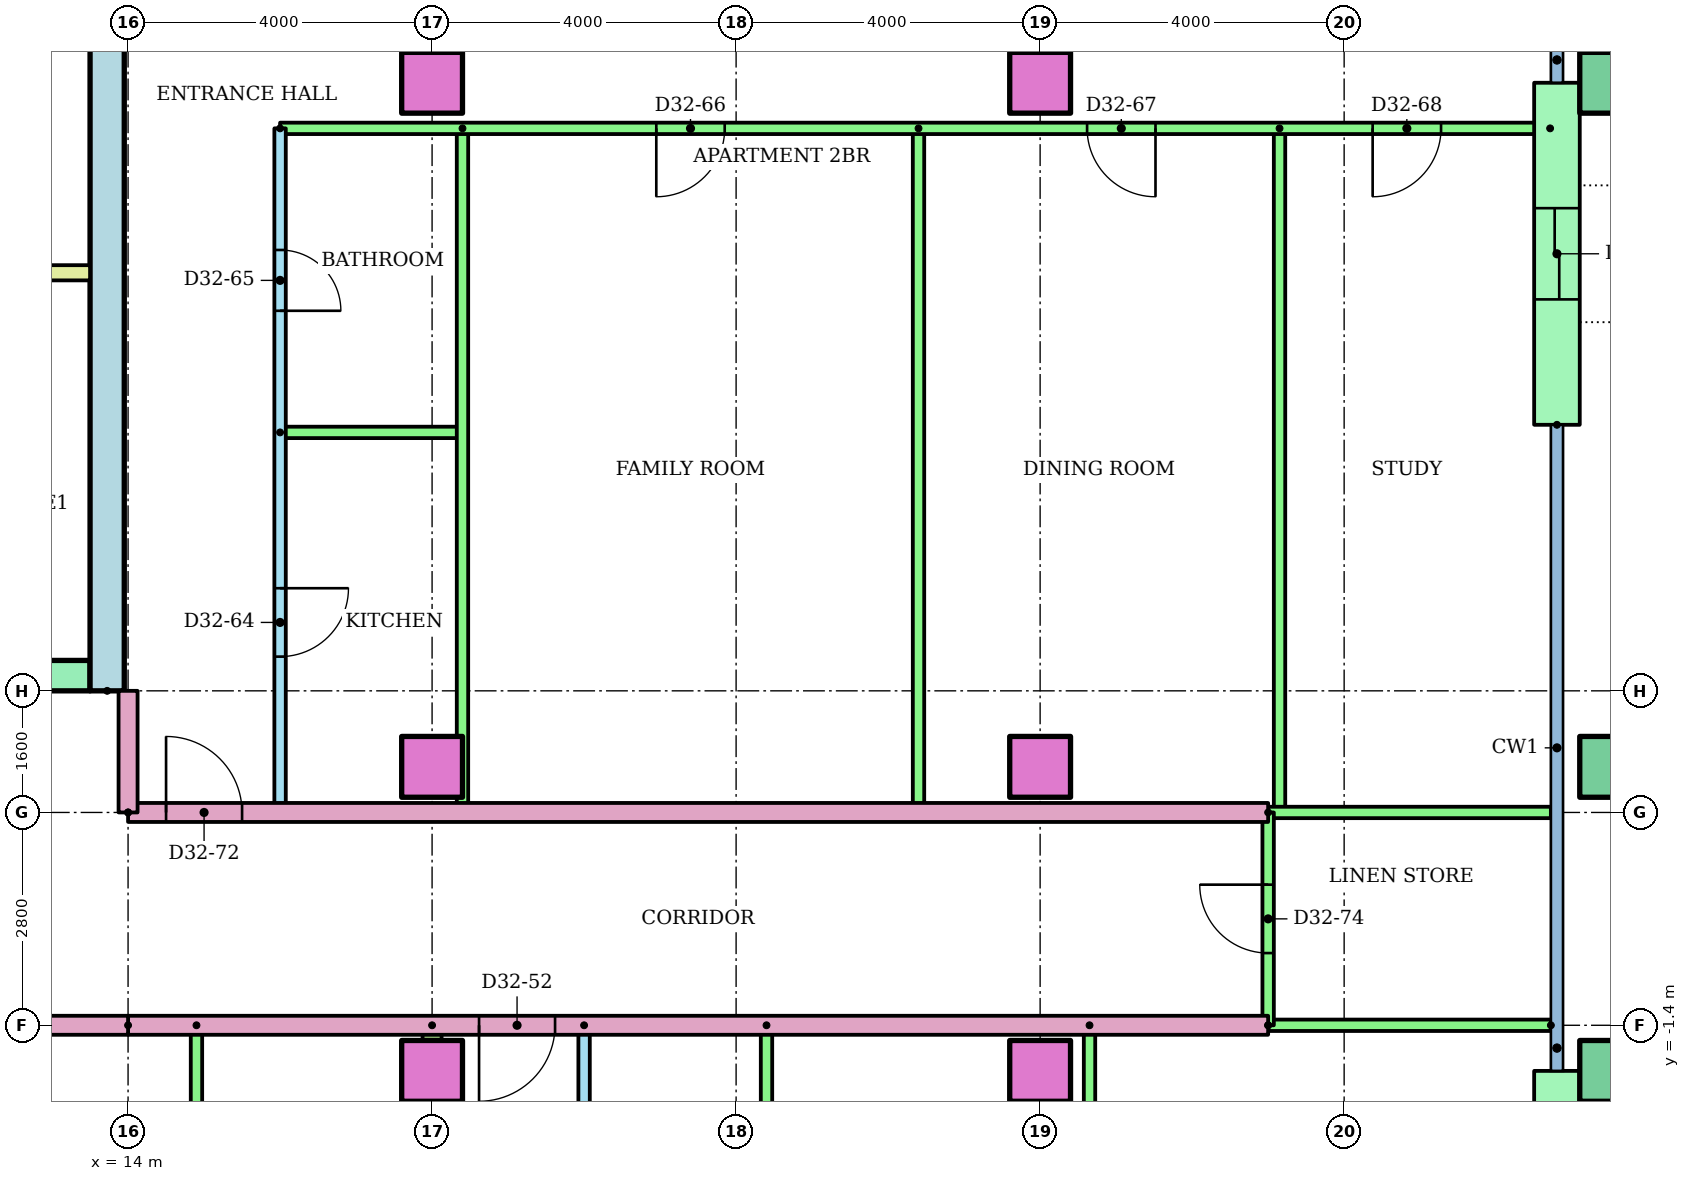
"""IFC4 building model, lengths in metres.
Left out: names, types, materials, properties, quantities, classifications, styles, units other than length and angle.
Written with IfcOpenShell. Run it as: python <this file> out.ifc"""

import sys

from ifc_helpers import new_model, si_unit, direction, frame, frame_2d, origin, origin_2d, place, context, subcontext, project, spatial, rectangle, hollow_rectangle, extrude, element, fill, save


model = new_model("IFC4")
c1 = context("Model", 3, precision=1e-05, world=origin(), true_north=direction((0.0, 1.0)))
c2 = subcontext(c1, "Body", "Model", "MODEL_VIEW")
j1 = project(units=[si_unit("LENGTHUNIT", "METRE"), si_unit("PLANEANGLEUNIT", "RADIAN")], contexts=[c1])
p1 = place(None, origin())
s1 = spatial("IfcSite", under=j1, at=p1, CompositionType="ELEMENT")
p2 = place(p1, origin())
s2 = spatial("IfcBuilding", under=s1, at=p2, CompositionType="ELEMENT")
p3 = place(p2, frame((0.0, 0.0, 126.2)))
s3 = spatial("IfcBuildingStorey", under=s2, at=p3, CompositionType="ELEMENT", Elevation=126.2)
for number, where in (
    (1, (18.0, -2.0, 0.0)),
    (2, (26.0, -2.0, 0.0)),
):
    element("IfcColumn", number, at=place(p3, frame(where)), inside=s3, PredefinedType="COLUMN", context=c2, shape_type="SweptSolid", body=[
        extrude(rectangle(XDim=0.8, YDim=0.8, at=origin_2d()), origin(), (0.0, 0.0, 1.0), 3.2),
    ])
p4 = place(p3, frame((33.5, -2.0, 0.0)))
e3 = element("IfcColumn", 3, at=p4, inside=s3, PredefinedType="COLUMN", context=c2, shape_type="SweptSolid", body=[
    extrude(hollow_rectangle(XDim=0.8, YDim=0.8, WallThickness=0.04, at=origin_2d()), origin(), (0.0, 0.0, 1.0), 3.2),
])
for number, where in (
    (4, (18.0, 2.0, 0.0)),
    (5, (26.0, 2.0, 0.0)),
):
    element("IfcColumn", number, at=place(p3, frame(where)), inside=s3, PredefinedType="COLUMN", context=c2, shape_type="SweptSolid", body=[
        extrude(rectangle(XDim=0.8, YDim=0.8, at=origin_2d()), origin(), (0.0, 0.0, 1.0), 3.2),
    ])
p5 = place(p3, frame((33.5, 2.0, 0.0)))
e6 = element("IfcColumn", 6, at=p5, inside=s3, PredefinedType="COLUMN", context=c2, shape_type="SweptSolid", body=[
    extrude(hollow_rectangle(XDim=0.8, YDim=0.8, WallThickness=0.04, at=origin_2d()), origin(), (0.0, 0.0, 1.0), 3.2),
])
for number, where in (
    (7, (18.0, 11.0, 0.0)),
    (8, (26.0, 11.0, 0.0)),
):
    element("IfcColumn", number, at=place(p3, frame(where)), inside=s3, PredefinedType="COLUMN", context=c2, shape_type="SweptSolid", body=[
        extrude(rectangle(XDim=0.8, YDim=0.8, at=origin_2d()), origin(), (0.0, 0.0, 1.0), 3.2),
    ])
p6 = place(p3, frame((33.5, 11.0, 0.0)))
e9 = element("IfcColumn", 9, at=p6, inside=s3, PredefinedType="COLUMN", context=c2, shape_type="SweptSolid", body=[
    extrude(hollow_rectangle(XDim=0.8, YDim=0.8, WallThickness=0.04, at=origin_2d()), origin(), (0.0, 0.0, 1.0), 3.2),
])
p7 = place(p3, frame((32.8, -5.7, 0.0), z_axis=(0.0, 0.0, 1.0), x_axis=(0.0, 1.0, 0.0)))
e10 = element("IfcWall", 10, at=p7, inside=s3, PredefinedType="STANDARD", context=c2, shape_type="SweptSolid", body=[
    extrude(rectangle(XDim=3.7, YDim=0.6, at=frame_2d((1.85, 0.0))), origin(), (0.0, 0.0, 1.0), 2.92),
])
p8 = place(p7, frame((1.25, 0.0, 0.0)))
e11 = element("IfcOpeningElement", 11, at=p8, cuts=e10, PredefinedType="OPENING", context=c2, shape_type="SweptSolid", body=[
    extrude(rectangle(XDim=1.2, YDim=2.1, at=frame_2d((0.6, 1.05))), frame((0.0, 0.31, 0.0), z_axis=(0.0, -1.0, 0.0), x_axis=(1.0, 0.0, 0.0)), (0.0, 0.0, 1.0), 0.62),
])
p9 = place(p3, frame((32.8, 6.5, 0.0), z_axis=(0.0, 0.0, 1.0), x_axis=(0.0, 1.0, 0.0)))
e12 = element("IfcWall", 12, at=p9, inside=s3, PredefinedType="STANDARD", context=c2, shape_type="SweptSolid", body=[
    extrude(rectangle(XDim=4.5, YDim=0.6, at=frame_2d((2.25, 0.0))), origin(), (0.0, 0.0, 1.0), 2.92),
])
p10 = place(p9, frame((1.65, 0.0, 0.0)))
e13 = element("IfcOpeningElement", 13, at=p10, cuts=e12, PredefinedType="OPENING", context=c2, shape_type="SweptSolid", body=[
    extrude(rectangle(XDim=1.2, YDim=2.1, at=frame_2d((0.6, 1.05))), frame((0.0, 0.31, 0.0), z_axis=(0.0, -1.0, 0.0), x_axis=(1.0, 0.0, 0.0)), (0.0, 0.0, 1.0), 0.62),
])
p11 = place(p3, frame((13.725, 3.0, 0.0), z_axis=(0.0, 0.0, 1.0), x_axis=(0.0, 1.0, 0.0)))
e14 = element("IfcWall", 14, at=p11, inside=s3, PredefinedType="SHEAR", context=c2, shape_type="SweptSolid", body=[
    extrude(rectangle(XDim=17.0, YDim=0.45, at=frame_2d((8.5, 0.0))), origin(), (0.0, 0.0, 1.0), 2.92),
])
p12 = place(p3, frame((-13.5, 3.2, 0.0)))
e15 = element("IfcWall", 15, at=p12, inside=s3, PredefinedType="SHEAR", context=c2, shape_type="SweptSolid", body=[
    extrude(rectangle(XDim=27.0, YDim=0.4, at=frame_2d((13.5, 0.0))), origin(), (0.0, 0.0, 1.0), 2.92),
])
p13 = place(p12, frame((6.861, 0.0, 0.0)))
e16 = element("IfcOpeningElement", 16, at=p13, cuts=e15, PredefinedType="OPENING", context=c2, shape_type="SweptSolid", body=[
    extrude(rectangle(XDim=1.1, YDim=2.1, at=frame_2d((0.55, 1.05))), frame((0.0, 0.21, 0.0), z_axis=(0.0, -1.0, 0.0), x_axis=(1.0, 0.0, 0.0)), (0.0, 0.0, 1.0), 0.42),
])
p14 = place(p12, frame((9.906, 0.0, 0.0)))
e17 = element("IfcOpeningElement", 17, at=p14, cuts=e15, PredefinedType="OPENING", context=c2, shape_type="SweptSolid", body=[
    extrude(rectangle(XDim=1.1, YDim=2.1, at=frame_2d((0.55, 1.05))), frame((0.0, 0.21, 0.0), z_axis=(0.0, -1.0, 0.0), x_axis=(1.0, 0.0, 0.0)), (0.0, 0.0, 1.0), 0.42),
])
p15 = place(p12, frame((15.994, 0.0, 0.0)))
e18 = element("IfcOpeningElement", 18, at=p15, cuts=e15, PredefinedType="OPENING", context=c2, shape_type="SweptSolid", body=[
    extrude(rectangle(XDim=1.1, YDim=2.1, at=frame_2d((0.55, 1.05))), frame((0.0, 0.21, 0.0), z_axis=(0.0, -1.0, 0.0), x_axis=(1.0, 0.0, 0.0)), (0.0, 0.0, 1.0), 0.42),
])
p16 = place(p12, frame((19.039, 0.0, 0.0)))
e19 = element("IfcOpeningElement", 19, at=p16, cuts=e15, PredefinedType="OPENING", context=c2, shape_type="SweptSolid", body=[
    extrude(rectangle(XDim=1.1, YDim=2.1, at=frame_2d((0.55, 1.05))), frame((0.0, 0.21, 0.0), z_axis=(0.0, -1.0, 0.0), x_axis=(1.0, 0.0, 0.0)), (0.0, 0.0, 1.0), 0.42),
])
p17 = place(p12, frame((12.6, 0.0, 0.0)))
e20 = element("IfcOpeningElement", 20, at=p17, cuts=e15, PredefinedType="OPENING", context=c2, shape_type="SweptSolid", body=[
    extrude(rectangle(XDim=1.8, YDim=2.1, at=frame_2d((0.9, 1.05))), frame((0.0, 0.21, 0.0), z_axis=(0.0, -1.0, 0.0), x_axis=(1.0, 0.0, 0.0)), (0.0, 0.0, 1.0), 0.42),
])
p18 = place(p3, frame((9.6, 8.5, 0.0)))
e21 = element("IfcWall", 21, at=p18, inside=s3, PredefinedType="PARTITIONING", context=c2, shape_type="SweptSolid", body=[
    extrude(rectangle(XDim=3.9, YDim=0.2, at=frame_2d((1.95, 0.0))), origin(), (0.0, 0.0, 1.0), 2.92),
])
p19 = place(p3, frame((14.9, -1.4, 0.0), z_axis=(0.0, 0.0, 1.0), x_axis=(0.0, -1.0, 0.0)))
e22 = element("IfcWall", 22, at=p19, inside=s3, PredefinedType="PARTITIONING", context=c2, shape_type="SweptSolid", body=[
    extrude(rectangle(XDim=6.6, YDim=0.15, at=frame_2d((3.3, 0.0))), origin(), (0.0, 0.0, 1.0), 2.4),
])
p20 = place(p3, frame((20.0, -1.4, 0.0), z_axis=(0.0, 0.0, 1.0), x_axis=(0.0, -1.0, 0.0)))
e23 = element("IfcWall", 23, at=p20, inside=s3, PredefinedType="PARTITIONING", context=c2, shape_type="SweptSolid", body=[
    extrude(rectangle(XDim=6.6, YDim=0.15, at=frame_2d((3.3, 0.0))), origin(), (0.0, 0.0, 1.0), 2.4),
])
p21 = place(p20, frame((1.425, 0.0, 0.0)))
e24 = element("IfcOpeningElement", 24, at=p21, cuts=e23, PredefinedType="OPENING", context=c2, shape_type="SweptSolid", body=[
    extrude(rectangle(XDim=0.9, YDim=2.1, at=frame_2d((0.45, 1.05))), frame((0.0, 0.085, 0.0), z_axis=(0.0, -1.0, 0.0), x_axis=(1.0, 0.0, 0.0)), (0.0, 0.0, 1.0), 0.17),
])
p22 = place(p20, frame((4.775, 0.0, 0.0)))
e25 = element("IfcOpeningElement", 25, at=p22, cuts=e23, PredefinedType="OPENING", context=c2, shape_type="SweptSolid", body=[
    extrude(rectangle(XDim=0.8, YDim=2.1, at=frame_2d((0.4, 1.05))), frame((0.0, 0.085, 0.0), z_axis=(0.0, -1.0, 0.0), x_axis=(1.0, 0.0, 0.0)), (0.0, 0.0, 1.0), 0.17),
])
for number, where, z_axis, x_axis in (
    (26, (22.4, -1.4, 0.0), (0.0, 0.0, 1.0), (0.0, -1.0, 0.0)),
    (27, (26.65, -1.4, 0.0), (0.0, 0.0, 1.0), (0.0, -1.0, 0.0)),
):
    element("IfcWall", number, at=place(p3, frame(where, z_axis=z_axis, x_axis=x_axis)), inside=s3, PredefinedType="PARTITIONING", context=c2, shape_type="SweptSolid", body=[
        extrude(rectangle(XDim=6.6, YDim=0.15, at=frame_2d((3.3, 0.0))), origin(), (0.0, 0.0, 1.0), 2.4),
    ])
p23 = place(p3, frame((18.0, -1.4, 0.0), z_axis=(0.0, 0.0, 1.0), x_axis=(0.0, -1.0, 0.0)))
e28 = element("IfcWall", 28, at=p23, inside=s3, PredefinedType="PARTITIONING", context=c2, shape_type="SweptSolid", body=[
    extrude(rectangle(XDim=14.91, YDim=0.25, at=frame_2d((7.455, 0.0))), origin(), (0.0, 0.0, 1.0), 2.4),
])
p24 = place(p3, frame((29.0, -1.4, 0.0), z_axis=(0.0, 0.0, 1.0), x_axis=(-1.0, 0.0, 0.0)))
e29 = element("IfcWall", 29, at=p24, inside=s3, PredefinedType="PARTITIONING", context=c2, shape_type="SweptSolid", body=[
    extrude(rectangle(XDim=15.0, YDim=0.25, at=frame_2d((7.5, 0.0))), origin(), (0.0, 0.0, 1.0), 2.4),
])
p25 = place(p24, frame((9.382, 0.0, 0.0)))
e30 = element("IfcOpeningElement", 30, at=p25, cuts=e29, PredefinedType="OPENING", context=c2, shape_type="SweptSolid", body=[
    extrude(rectangle(XDim=1.0, YDim=2.1, at=frame_2d((0.5, 1.05))), frame((0.0, 0.135, 0.0), z_axis=(0.0, -1.0, 0.0), x_axis=(1.0, 0.0, 0.0)), (0.0, 0.0, 1.0), 0.27),
])
p26 = place(p3, frame((32.72, -1.4, 0.0), z_axis=(0.0, 0.0, 1.0), x_axis=(-1.0, 0.0, 0.0)))
e31 = element("IfcWall", 31, at=p26, inside=s3, PredefinedType="PARTITIONING", context=c2, shape_type="SweptSolid", body=[
    extrude(rectangle(XDim=3.72, YDim=0.15, at=frame_2d((1.86, 0.0))), origin(), (0.0, 0.0, 1.0), 2.4),
])
p27 = place(p3, frame((16.0, 10.4, 0.0), z_axis=(0.0, 0.0, 1.0), x_axis=(0.0, -1.0, 0.0)))
e32 = element("IfcWall", 32, at=p27, inside=s3, PredefinedType="PARTITIONING", context=c2, shape_type="SweptSolid", body=[
    extrude(rectangle(XDim=9.0, YDim=0.15, at=frame_2d((4.5, 0.0))), origin(), (0.0, 0.0, 1.0), 2.4),
])
p28 = place(p27, frame((6.05, 0.0, 0.0)))
e33 = element("IfcOpeningElement", 33, at=p28, cuts=e32, PredefinedType="OPENING", context=c2, shape_type="SweptSolid", body=[
    extrude(rectangle(XDim=0.9, YDim=2.1, at=frame_2d((0.45, 1.05))), frame((0.0, 0.085, 0.0), z_axis=(0.0, -1.0, 0.0), x_axis=(1.0, 0.0, 0.0)), (0.0, 0.0, 1.0), 0.17),
])
p29 = place(p27, frame((1.6, 0.0, 0.0)))
e34 = element("IfcOpeningElement", 34, at=p29, cuts=e32, PredefinedType="OPENING", context=c2, shape_type="SweptSolid", body=[
    extrude(rectangle(XDim=0.8, YDim=2.1, at=frame_2d((0.4, 1.05))), frame((0.0, 0.085, 0.0), z_axis=(0.0, -1.0, 0.0), x_axis=(1.0, 0.0, 0.0)), (0.0, 0.0, 1.0), 0.17),
])
p30 = place(p3, frame((16.0, 6.4, 0.0)))
e35 = element("IfcWall", 35, at=p30, inside=s3, PredefinedType="PARTITIONING", context=c2, shape_type="SweptSolid", body=[
    extrude(rectangle(XDim=2.4, YDim=0.15, at=frame_2d((1.2, 0.0))), origin(), (0.0, 0.0, 1.0), 2.4),
])
for number, where, z_axis, x_axis in (
    (36, (18.4, 10.4, 0.0), (0.0, 0.0, 1.0), (0.0, -1.0, 0.0)),
    (37, (24.4, 10.4, 0.0), (0.0, 0.0, 1.0), (0.0, -1.0, 0.0)),
    (38, (29.15, 10.4, 0.0), (0.0, 0.0, 1.0), (0.0, -1.0, 0.0)),
):
    element("IfcWall", number, at=place(p3, frame(where, z_axis=z_axis, x_axis=x_axis)), inside=s3, PredefinedType="PARTITIONING", context=c2, shape_type="SweptSolid", body=[
        extrude(rectangle(XDim=9.0, YDim=0.15, at=frame_2d((4.5, 0.0))), origin(), (0.0, 0.0, 1.0), 2.4),
    ])
p31 = place(p3, frame((32.71, 10.4, 0.0), z_axis=(0.0, 0.0, 1.0), x_axis=(-1.0, 0.0, 0.0)))
e39 = element("IfcWall", 39, at=p31, inside=s3, PredefinedType="PARTITIONING", context=c2, shape_type="SweptSolid", body=[
    extrude(rectangle(XDim=16.71, YDim=0.15, at=frame_2d((8.355, 0.0))), origin(), (0.0, 0.0, 1.0), 2.4),
])
p32 = place(p31, frame((10.86, 0.0, 0.0)))
e40 = element("IfcOpeningElement", 40, at=p32, cuts=e39, PredefinedType="OPENING", context=c2, shape_type="SweptSolid", body=[
    extrude(rectangle(XDim=0.9, YDim=2.1, at=frame_2d((0.45, 1.05))), frame((0.0, 0.085, 0.0), z_axis=(0.0, -1.0, 0.0), x_axis=(1.0, 0.0, 0.0)), (0.0, 0.0, 1.0), 0.17),
])
p33 = place(p31, frame((5.192, 0.0, 0.0)))
e41 = element("IfcOpeningElement", 41, at=p33, cuts=e39, PredefinedType="OPENING", context=c2, shape_type="SweptSolid", body=[
    extrude(rectangle(XDim=0.9, YDim=2.1, at=frame_2d((0.45, 1.05))), frame((0.0, 0.085, 0.0), z_axis=(0.0, -1.0, 0.0), x_axis=(1.0, 0.0, 0.0)), (0.0, 0.0, 1.0), 0.17),
])
p34 = place(p31, frame((1.435, 0.0, 0.0)))
e42 = element("IfcOpeningElement", 42, at=p34, cuts=e39, PredefinedType="OPENING", context=c2, shape_type="SweptSolid", body=[
    extrude(rectangle(XDim=0.9, YDim=2.1, at=frame_2d((0.45, 1.05))), frame((0.0, 0.085, 0.0), z_axis=(0.0, -1.0, 0.0), x_axis=(1.0, 0.0, 0.0)), (0.0, 0.0, 1.0), 0.17),
])
p35 = place(p3, frame((14.0, 1.4, 0.0)))
e43 = element("IfcWall", 43, at=p35, inside=s3, PredefinedType="PARTITIONING", context=c2, shape_type="SweptSolid", body=[
    extrude(rectangle(XDim=15.0, YDim=0.25, at=frame_2d((7.5, 0.0))), origin(), (0.0, 0.0, 1.0), 2.4),
])
p36 = place(p35, frame((0.5, 0.0, 0.0)))
e44 = element("IfcOpeningElement", 44, at=p36, cuts=e43, PredefinedType="OPENING", context=c2, shape_type="SweptSolid", body=[
    extrude(rectangle(XDim=1.0, YDim=2.1, at=frame_2d((0.5, 1.05))), frame((0.0, 0.135, 0.0), z_axis=(0.0, -1.0, 0.0), x_axis=(1.0, 0.0, 0.0)), (0.0, 0.0, 1.0), 0.27),
])
p37 = place(p3, frame((29.0, 1.4, 0.0)))
e45 = element("IfcWall", 45, at=p37, inside=s3, PredefinedType="PARTITIONING", context=c2, shape_type="SweptSolid", body=[
    extrude(rectangle(XDim=3.72, YDim=0.15, at=frame_2d((1.86, 0.0))), origin(), (0.0, 0.0, 1.0), 2.4),
])
p38 = place(p3, frame((29.0, -1.4, 0.0), z_axis=(0.0, 0.0, 1.0), x_axis=(0.0, 1.0, 0.0)))
e46 = element("IfcWall", 46, at=p38, inside=s3, PredefinedType="PARTITIONING", context=c2, shape_type="SweptSolid", body=[
    extrude(rectangle(XDim=2.8, YDim=0.15, at=frame_2d((1.4, 0.0))), origin(), (0.0, 0.0, 1.0), 2.4),
])
p39 = place(p38, frame((0.95, 0.0, 0.0)))
e47 = element("IfcOpeningElement", 47, at=p39, cuts=e46, PredefinedType="OPENING", context=c2, shape_type="SweptSolid", body=[
    extrude(rectangle(XDim=0.9, YDim=2.1, at=frame_2d((0.45, 1.05))), frame((0.0, 0.085, 0.0), z_axis=(0.0, -1.0, 0.0), x_axis=(1.0, 0.0, 0.0)), (0.0, 0.0, 1.0), 0.17),
])
p40 = place(p3, frame((14.0, -1.4, 0.0), z_axis=(0.0, 0.0, 1.0), x_axis=(-1.0, 0.0, 0.0)))
e48 = element("IfcWall", 48, at=p40, inside=s3, PredefinedType="PARTITIONING", context=c2, shape_type="SweptSolid", body=[
    extrude(rectangle(XDim=28.0, YDim=0.25, at=frame_2d((14.0, 0.0))), origin(), (0.0, 0.0, 1.0), 2.4),
])
p41 = place(p40, frame((12.618, 0.0, 0.0)))
e49 = element("IfcOpeningElement", 49, at=p41, cuts=e48, PredefinedType="OPENING", context=c2, shape_type="SweptSolid", body=[
    extrude(rectangle(XDim=1.0, YDim=2.1, at=frame_2d((0.5, 1.05))), frame((0.0, 0.135, 0.0), z_axis=(0.0, -1.0, 0.0), x_axis=(1.0, 0.0, 0.0)), (0.0, 0.0, 1.0), 0.27),
])
p42 = place(p40, frame((10.382, 0.0, 0.0)))
e50 = element("IfcOpeningElement", 50, at=p42, cuts=e48, PredefinedType="OPENING", context=c2, shape_type="SweptSolid", body=[
    extrude(rectangle(XDim=1.0, YDim=2.1, at=frame_2d((0.5, 1.05))), frame((0.0, 0.135, 0.0), z_axis=(0.0, -1.0, 0.0), x_axis=(1.0, 0.0, 0.0)), (0.0, 0.0, 1.0), 0.27),
])
p43 = place(p3, frame((14.0, 1.4, 0.0), z_axis=(0.0, 0.0, 1.0), x_axis=(0.0, 1.0, 0.0)))
e51 = element("IfcWall", 51, at=p43, inside=s3, PredefinedType="PARTITIONING", context=c2, shape_type="SweptSolid", body=[
    extrude(rectangle(XDim=1.6, YDim=0.25, at=frame_2d((0.8, 0.0))), origin(), (0.0, 0.0, 1.0), 2.4),
])
p44 = place(p25, origin())
e52 = element("IfcDoor", 52, at=p44, inside=s3, OperationType="SINGLE_SWING_RIGHT", PredefinedType="DOOR", context=c2, shape_type="SweptSolid", body=[
    extrude(rectangle(XDim=1.0, YDim=2.1, at=frame_2d((0.5, 1.05))), frame((0.0, 0.025, 0.0), z_axis=(0.0, -1.0, 0.0), x_axis=(1.0, 0.0, 0.0)), (0.0, 0.0, 1.0), 0.05),
])
fill(e30, e52)
p45 = place(p28, origin())
e53 = element("IfcDoor", 53, at=p45, inside=s3, OperationType="SINGLE_SWING_LEFT", PredefinedType="DOOR", context=c2, shape_type="SweptSolid", body=[
    extrude(rectangle(XDim=0.9, YDim=2.1, at=frame_2d((0.45, 1.05))), frame((0.0, 0.025, 0.0), z_axis=(0.0, -1.0, 0.0), x_axis=(1.0, 0.0, 0.0)), (0.0, 0.0, 1.0), 0.05),
])
fill(e33, e53)
p46 = place(p29, origin())
e54 = element("IfcDoor", 54, at=p46, inside=s3, OperationType="SINGLE_SWING_RIGHT", PredefinedType="DOOR", context=c2, shape_type="SweptSolid", body=[
    extrude(rectangle(XDim=0.8, YDim=2.1, at=frame_2d((0.4, 1.05))), frame((0.0, 0.025, 0.0), z_axis=(0.0, -1.0, 0.0), x_axis=(1.0, 0.0, 0.0)), (0.0, 0.0, 1.0), 0.05),
])
fill(e34, e54)
p47 = place(p32, origin())
e55 = element("IfcDoor", 55, at=p47, inside=s3, OperationType="SINGLE_SWING_RIGHT", PredefinedType="DOOR", context=c2, shape_type="SweptSolid", body=[
    extrude(rectangle(XDim=0.9, YDim=2.1, at=frame_2d((0.45, 1.05))), frame((0.0, 0.025, 0.0), z_axis=(0.0, -1.0, 0.0), x_axis=(1.0, 0.0, 0.0)), (0.0, 0.0, 1.0), 0.05),
])
fill(e40, e55)
p48 = place(p33, origin())
e56 = element("IfcDoor", 56, at=p48, inside=s3, OperationType="SINGLE_SWING_LEFT", PredefinedType="DOOR", context=c2, shape_type="SweptSolid", body=[
    extrude(rectangle(XDim=0.9, YDim=2.1, at=frame_2d((0.45, 1.05))), frame((0.0, 0.025, 0.0), z_axis=(0.0, -1.0, 0.0), x_axis=(1.0, 0.0, 0.0)), (0.0, 0.0, 1.0), 0.05),
])
fill(e41, e56)
p49 = place(p34, origin())
e57 = element("IfcDoor", 57, at=p49, inside=s3, OperationType="SINGLE_SWING_RIGHT", PredefinedType="DOOR", context=c2, shape_type="SweptSolid", body=[
    extrude(rectangle(XDim=0.9, YDim=2.1, at=frame_2d((0.45, 1.05))), frame((0.0, 0.025, 0.0), z_axis=(0.0, -1.0, 0.0), x_axis=(1.0, 0.0, 0.0)), (0.0, 0.0, 1.0), 0.05),
])
fill(e42, e57)
p50 = place(p36, origin())
e58 = element("IfcDoor", 58, at=p50, inside=s3, OperationType="SINGLE_SWING_LEFT", PredefinedType="DOOR", context=c2, shape_type="SweptSolid", body=[
    extrude(rectangle(XDim=1.0, YDim=2.1, at=frame_2d((0.5, 1.05))), frame((0.0, 0.025, 0.0), z_axis=(0.0, -1.0, 0.0), x_axis=(1.0, 0.0, 0.0)), (0.0, 0.0, 1.0), 0.05),
])
fill(e44, e58)
p51 = place(p39, origin())
e59 = element("IfcDoor", 59, at=p51, inside=s3, OperationType="SINGLE_SWING_RIGHT", PredefinedType="DOOR", context=c2, shape_type="SweptSolid", body=[
    extrude(rectangle(XDim=0.9, YDim=2.1, at=frame_2d((0.45, 1.05))), frame((0.0, 0.025, 0.0), z_axis=(0.0, -1.0, 0.0), x_axis=(1.0, 0.0, 0.0)), (0.0, 0.0, 1.0), 0.05),
])
fill(e47, e59)
p52 = place(p10, origin())
e60 = element("IfcDoor", 60, at=p52, inside=s3, OperationType="SLIDING_TO_LEFT", PredefinedType="DOOR", context=c2, shape_type="SweptSolid", body=[
    extrude(rectangle(XDim=1.2, YDim=2.1, at=frame_2d((0.6, 1.05))), frame((0.0, 0.025, 0.0), z_axis=(0.0, -1.0, 0.0), x_axis=(1.0, 0.0, 0.0)), (0.0, 0.0, 1.0), 0.05),
])
fill(e13, e60)
save(model, sys.argv[1])
